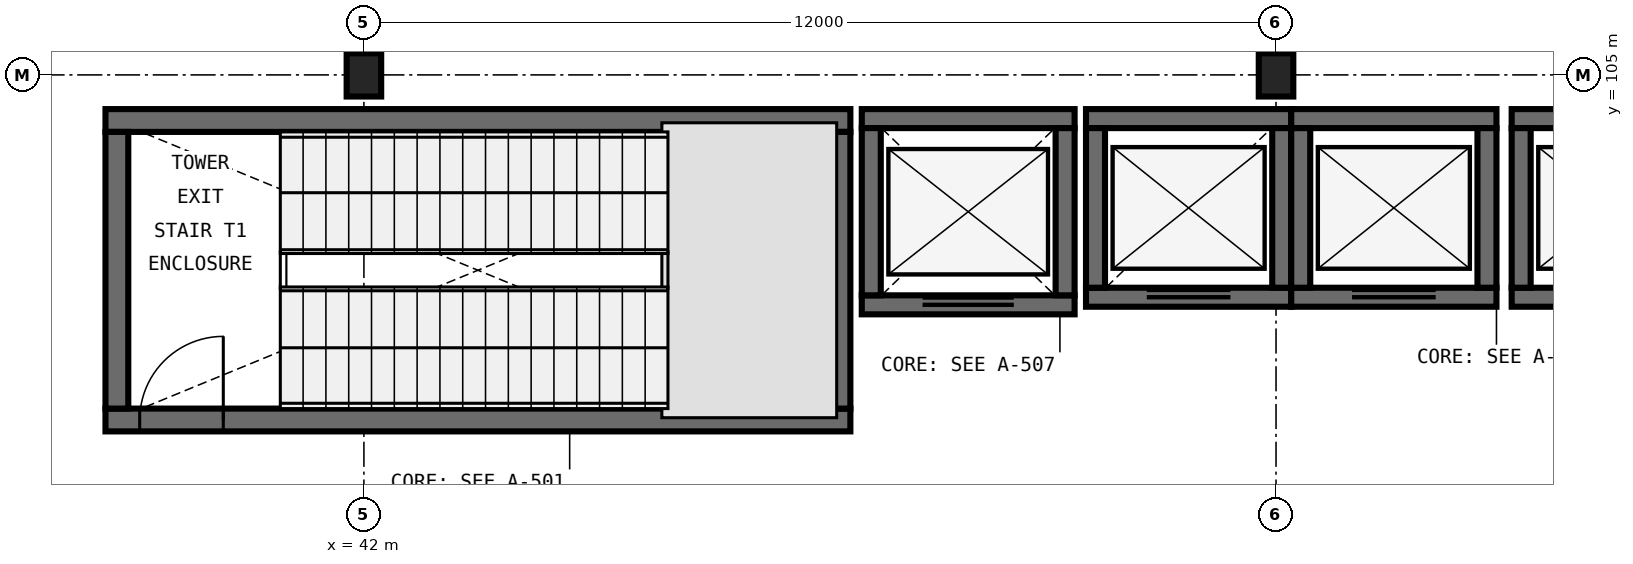
"""IFC4 building model, lengths in metres.
Left out: names, types, materials, properties, quantities, classifications, styles, units other than length and angle.
Written with IfcOpenShell. Run it as: python <this file> out.ifc"""

import sys

from ifc_helpers import new_model, si_unit, direction, frame, frame_2d, origin, origin_2d, place, context, subcontext, project, spatial, rectangle, i_section, extrude, element, fill, save


model = new_model("IFC4")
c1 = context("Model", 3, precision=1e-05, world=origin(), true_north=direction((0.0, 1.0)))
c2 = subcontext(c1, "Body", "Model", "MODEL_VIEW")
j1 = project(units=[si_unit("LENGTHUNIT", "METRE"), si_unit("PLANEANGLEUNIT", "RADIAN")], contexts=[c1])
p1 = place(None, origin())
s1 = spatial("IfcSite", under=j1, at=p1, CompositionType="ELEMENT")
p2 = place(p1, origin())
s2 = spatial("IfcBuilding", under=s1, at=p2, CompositionType="ELEMENT")
p3 = place(p2, frame((0.0, 0.0, 6.0)))
s3 = spatial("IfcBuildingStorey", under=s2, at=p3, CompositionType="ELEMENT", Elevation=6.0)
for number, where, z_axis, x_axis in (
    (1, (42.0, 105.0, 0.0), (0.0, 0.0, 1.0), (1.0, 0.0, 0.0)),
    (2, (54.0, 105.0, 0.0), (0.0, 0.0, 1.0), (1.0, 0.0, 0.0)),
):
    element("IfcColumn", number, at=place(p3, frame(where, z_axis=z_axis, x_axis=x_axis)), inside=s3, PredefinedType="COLUMN", context=c2, shape_type="SweptSolid", body=[
        extrude(i_section(OverallWidth=0.454, OverallDepth=0.569, WebThickness=0.078, FlangeThickness=0.125, FilletRadius=0.031, at=origin_2d()), origin(), (0.0, 0.0, 1.0), 6.0),
    ])
p4 = place(p3, frame((38.6, 100.46, 0.0), z_axis=(0.0, 0.0, 1.0), x_axis=(1.0, 0.0, 0.0)))
e3 = element("IfcWall", 3, at=p4, inside=s3, PredefinedType="SHEAR", context=c2, shape_type="SweptSolid", body=[
    extrude(rectangle(XDim=9.8, YDim=0.3, at=frame_2d((4.9, 0.0))), origin(), (0.0, 0.0, 1.0), 6.0),
])
p5 = place(p4, frame((0.45, 0.0, 0.0)))
e4 = element("IfcOpeningElement", 4, at=p5, cuts=e3, PredefinedType="OPENING", context=c2, shape_type="SweptSolid", body=[
    extrude(rectangle(XDim=1.1, YDim=2.2, at=frame_2d((0.55, 1.1))), frame((0.0, 0.165, 0.0), z_axis=(0.0, -1.0, 0.0), x_axis=(1.0, 0.0, 0.0)), (0.0, 0.0, 1.0), 0.33),
])
p6 = place(p3, frame((48.4, 104.4, 0.0), z_axis=(0.0, 0.0, 1.0), x_axis=(-1.0, 0.0, 0.0)))
e5 = element("IfcWall", 5, at=p6, inside=s3, PredefinedType="SHEAR", context=c2, shape_type="SweptSolid", body=[
    extrude(rectangle(XDim=9.8, YDim=0.3, at=frame_2d((4.9, 0.0))), origin(), (0.0, 0.0, 1.0), 6.0),
])
for number, where, z_axis, x_axis in (
    (6, (38.75, 104.25, 0.0), (0.0, 0.0, 1.0), (0.0, -1.0, 0.0)),
    (7, (48.25, 100.61, 0.0), (0.0, 0.0, 1.0), (0.0, 1.0, 0.0)),
):
    element("IfcWall", number, at=place(p3, frame(where, z_axis=z_axis, x_axis=x_axis)), inside=s3, PredefinedType="SHEAR", context=c2, shape_type="SweptSolid", body=[
        extrude(rectangle(XDim=3.64, YDim=0.3, at=frame_2d((1.82, 0.0))), origin(), (0.0, 0.0, 1.0), 6.0),
    ])
p7 = place(p3, frame((48.55, 101.975, 0.0), z_axis=(0.0, 0.0, 1.0), x_axis=(1.0, 0.0, 0.0)))
e8 = element("IfcWall", 8, at=p7, inside=s3, PredefinedType="SHEAR", context=c2, shape_type="SweptSolid", body=[
    extrude(rectangle(XDim=2.8, YDim=0.25, at=frame_2d((1.4, 0.0))), origin(), (0.0, 0.0, 1.0), 6.0),
])
p8 = place(p7, frame((0.8, 0.0, 0.0)))
e9 = element("IfcOpeningElement", 9, at=p8, cuts=e8, PredefinedType="OPENING", context=c2, shape_type="SweptSolid", body=[
    extrude(rectangle(XDim=1.2, YDim=2.2, at=frame_2d((0.6, 1.1))), frame((0.0, 0.14, 0.0), z_axis=(0.0, -1.0, 0.0), x_axis=(1.0, 0.0, 0.0)), (0.0, 0.0, 1.0), 0.28),
])
p9 = place(p3, frame((51.35, 104.425, 0.0), z_axis=(0.0, 0.0, 1.0), x_axis=(-1.0, 0.0, 0.0)))
e10 = element("IfcWall", 10, at=p9, inside=s3, PredefinedType="SHEAR", context=c2, shape_type="SweptSolid", body=[
    extrude(rectangle(XDim=2.8, YDim=0.25, at=frame_2d((1.4, 0.0))), origin(), (0.0, 0.0, 1.0), 6.0),
])
for number, where, z_axis, x_axis in (
    (11, (48.675, 104.3, 0.0), (0.0, 0.0, 1.0), (0.0, -1.0, 0.0)),
    (12, (51.225, 102.1, 0.0), (0.0, 0.0, 1.0), (0.0, 1.0, 0.0)),
):
    element("IfcWall", number, at=place(p3, frame(where, z_axis=z_axis, x_axis=x_axis)), inside=s3, PredefinedType="SHEAR", context=c2, shape_type="SweptSolid", body=[
        extrude(rectangle(XDim=2.2, YDim=0.25, at=frame_2d((1.1, 0.0))), origin(), (0.0, 0.0, 1.0), 6.0),
    ])
p10 = place(p3, frame((51.5, 102.075, 0.0), z_axis=(0.0, 0.0, 1.0), x_axis=(1.0, 0.0, 0.0)))
e13 = element("IfcWall", 13, at=p10, inside=s3, PredefinedType="SHEAR", context=c2, shape_type="SweptSolid", body=[
    extrude(rectangle(XDim=2.7, YDim=0.25, at=frame_2d((1.35, 0.0))), origin(), (0.0, 0.0, 1.0), 6.0),
])
p11 = place(p10, frame((0.8, 0.0, 0.0)))
e14 = element("IfcOpeningElement", 14, at=p11, cuts=e13, PredefinedType="OPENING", context=c2, shape_type="SweptSolid", body=[
    extrude(rectangle(XDim=1.1, YDim=2.2, at=frame_2d((0.55, 1.1))), frame((0.0, 0.14, 0.0), z_axis=(0.0, -1.0, 0.0), x_axis=(1.0, 0.0, 0.0)), (0.0, 0.0, 1.0), 0.28),
])
p12 = place(p3, frame((54.2, 104.425, 0.0), z_axis=(0.0, 0.0, 1.0), x_axis=(-1.0, 0.0, 0.0)))
e15 = element("IfcWall", 15, at=p12, inside=s3, PredefinedType="SHEAR", context=c2, shape_type="SweptSolid", body=[
    extrude(rectangle(XDim=2.7, YDim=0.25, at=frame_2d((1.35, 0.0))), origin(), (0.0, 0.0, 1.0), 6.0),
])
for number, where, z_axis, x_axis in (
    (16, (51.625, 104.3, 0.0), (0.0, 0.0, 1.0), (0.0, -1.0, 0.0)),
    (17, (54.075, 102.2, 0.0), (0.0, 0.0, 1.0), (0.0, 1.0, 0.0)),
):
    element("IfcWall", number, at=place(p3, frame(where, z_axis=z_axis, x_axis=x_axis)), inside=s3, PredefinedType="SHEAR", context=c2, shape_type="SweptSolid", body=[
        extrude(rectangle(XDim=2.1, YDim=0.25, at=frame_2d((1.05, 0.0))), origin(), (0.0, 0.0, 1.0), 6.0),
    ])
p13 = place(p3, frame((54.2, 102.075, 0.0), z_axis=(0.0, 0.0, 1.0), x_axis=(1.0, 0.0, 0.0)))
e18 = element("IfcWall", 18, at=p13, inside=s3, PredefinedType="SHEAR", context=c2, shape_type="SweptSolid", body=[
    extrude(rectangle(XDim=2.7, YDim=0.25, at=frame_2d((1.35, 0.0))), origin(), (0.0, 0.0, 1.0), 6.0),
])
p14 = place(p13, frame((0.8, 0.0, 0.0)))
e19 = element("IfcOpeningElement", 19, at=p14, cuts=e18, PredefinedType="OPENING", context=c2, shape_type="SweptSolid", body=[
    extrude(rectangle(XDim=1.1, YDim=2.2, at=frame_2d((0.55, 1.1))), frame((0.0, 0.14, 0.0), z_axis=(0.0, -1.0, 0.0), x_axis=(1.0, 0.0, 0.0)), (0.0, 0.0, 1.0), 0.28),
])
p15 = place(p3, frame((56.9, 104.425, 0.0), z_axis=(0.0, 0.0, 1.0), x_axis=(-1.0, 0.0, 0.0)))
e20 = element("IfcWall", 20, at=p15, inside=s3, PredefinedType="SHEAR", context=c2, shape_type="SweptSolid", body=[
    extrude(rectangle(XDim=2.7, YDim=0.25, at=frame_2d((1.35, 0.0))), origin(), (0.0, 0.0, 1.0), 6.0),
])
for number, where, z_axis, x_axis in (
    (21, (54.325, 104.3, 0.0), (0.0, 0.0, 1.0), (0.0, -1.0, 0.0)),
    (22, (56.775, 102.2, 0.0), (0.0, 0.0, 1.0), (0.0, 1.0, 0.0)),
):
    element("IfcWall", number, at=place(p3, frame(where, z_axis=z_axis, x_axis=x_axis)), inside=s3, PredefinedType="SHEAR", context=c2, shape_type="SweptSolid", body=[
        extrude(rectangle(XDim=2.1, YDim=0.25, at=frame_2d((1.05, 0.0))), origin(), (0.0, 0.0, 1.0), 6.0),
    ])
p16 = place(p3, frame((57.1, 102.075, 0.0), z_axis=(0.0, 0.0, 1.0), x_axis=(1.0, 0.0, 0.0)))
e23 = element("IfcWall", 23, at=p16, inside=s3, PredefinedType="SHEAR", context=c2, shape_type="SweptSolid", body=[
    extrude(rectangle(XDim=2.7, YDim=0.25, at=frame_2d((1.35, 0.0))), origin(), (0.0, 0.0, 1.0), 6.0),
])
p17 = place(p16, frame((0.8, 0.0, 0.0)))
e24 = element("IfcOpeningElement", 24, at=p17, cuts=e23, PredefinedType="OPENING", context=c2, shape_type="SweptSolid", body=[
    extrude(rectangle(XDim=1.1, YDim=2.2, at=frame_2d((0.55, 1.1))), frame((0.0, 0.14, 0.0), z_axis=(0.0, -1.0, 0.0), x_axis=(1.0, 0.0, 0.0)), (0.0, 0.0, 1.0), 0.28),
])
p18 = place(p3, frame((59.8, 104.425, 0.0), z_axis=(0.0, 0.0, 1.0), x_axis=(-1.0, 0.0, 0.0)))
e25 = element("IfcWall", 25, at=p18, inside=s3, PredefinedType="SHEAR", context=c2, shape_type="SweptSolid", body=[
    extrude(rectangle(XDim=2.7, YDim=0.25, at=frame_2d((1.35, 0.0))), origin(), (0.0, 0.0, 1.0), 6.0),
])
p19 = place(p3, frame((57.225, 104.3, 0.0), z_axis=(0.0, 0.0, 1.0), x_axis=(0.0, -1.0, 0.0)))
e26 = element("IfcWall", 26, at=p19, inside=s3, PredefinedType="SHEAR", context=c2, shape_type="SweptSolid", body=[
    extrude(rectangle(XDim=2.1, YDim=0.25, at=frame_2d((1.05, 0.0))), origin(), (0.0, 0.0, 1.0), 6.0),
])
p20 = place(p5, origin())
e27 = element("IfcDoor", 27, at=p20, inside=s3, OperationType="SINGLE_SWING_RIGHT", PredefinedType="DOOR", context=c2, shape_type="SweptSolid", body=[
    extrude(rectangle(XDim=1.1, YDim=2.2, at=frame_2d((0.55, 1.1))), frame((0.0, 0.025, 0.0), z_axis=(0.0, -1.0, 0.0), x_axis=(1.0, 0.0, 0.0)), (0.0, 0.0, 1.0), 0.05),
])
fill(e4, e27)
p21 = place(p8, origin())
e28 = element("IfcDoor", 28, at=p21, inside=s3, OperationType="DOUBLE_DOOR_SLIDING", PredefinedType="DOOR", context=c2, shape_type="SweptSolid", body=[
    extrude(rectangle(XDim=1.2, YDim=2.2, at=frame_2d((0.6, 1.1))), frame((0.0, 0.025, 0.0), z_axis=(0.0, -1.0, 0.0), x_axis=(1.0, 0.0, 0.0)), (0.0, 0.0, 1.0), 0.05),
])
fill(e9, e28)
p22 = place(p11, origin())
e29 = element("IfcDoor", 29, at=p22, inside=s3, OperationType="DOUBLE_DOOR_SLIDING", PredefinedType="DOOR", context=c2, shape_type="SweptSolid", body=[
    extrude(rectangle(XDim=1.1, YDim=2.2, at=frame_2d((0.55, 1.1))), frame((0.0, 0.025, 0.0), z_axis=(0.0, -1.0, 0.0), x_axis=(1.0, 0.0, 0.0)), (0.0, 0.0, 1.0), 0.05),
])
fill(e14, e29)
p23 = place(p14, origin())
e30 = element("IfcDoor", 30, at=p23, inside=s3, OperationType="DOUBLE_DOOR_SLIDING", PredefinedType="DOOR", context=c2, shape_type="SweptSolid", body=[
    extrude(rectangle(XDim=1.1, YDim=2.2, at=frame_2d((0.55, 1.1))), frame((0.0, 0.025, 0.0), z_axis=(0.0, -1.0, 0.0), x_axis=(1.0, 0.0, 0.0)), (0.0, 0.0, 1.0), 0.05),
])
fill(e19, e30)
save(model, sys.argv[1])
